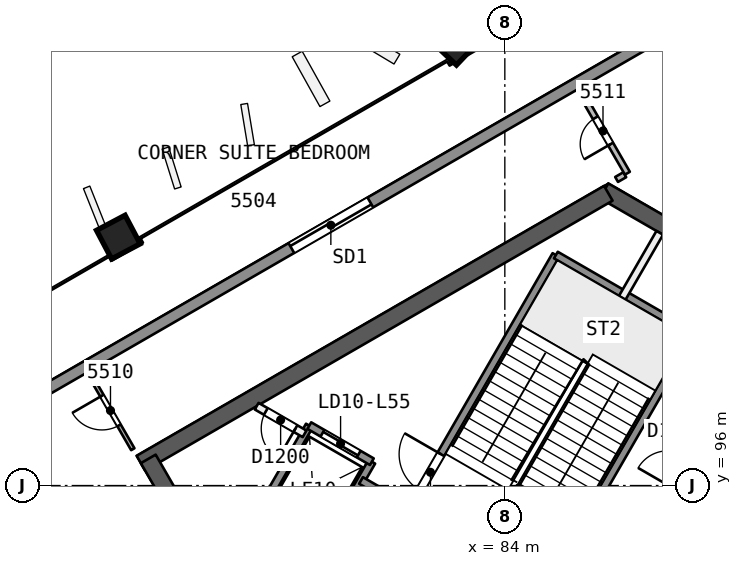
"""IFC4 building model, lengths in metres.
Left out: names, types, materials, properties, quantities, classifications, styles, units other than length and angle.
Written with IfcOpenShell. Run it as: python <this file> out.ifc"""

import sys

from ifc_helpers import new_model, si_unit, direction, frame, frame_2d, origin, origin_2d, place, context, subcontext, project, spatial, rectangle, extrude, element, fill, save


model = new_model("IFC4")
c1 = context("Model", 3, precision=1e-05, world=origin(), true_north=direction((0.0, 1.0)))
c2 = subcontext(c1, "Body", "Model", "MODEL_VIEW")
j1 = project(units=[si_unit("LENGTHUNIT", "METRE"), si_unit("PLANEANGLEUNIT", "RADIAN")], contexts=[c1])
p1 = place(None, origin())
s1 = spatial("IfcSite", under=j1, at=p1, CompositionType="ELEMENT")
p2 = place(p1, origin())
s2 = spatial("IfcBuilding", under=s1, at=p2, CompositionType="ELEMENT")
p3 = place(p2, frame((0.0, 0.0, 224.3)))
s3 = spatial("IfcBuildingStorey", under=s2, at=p3, CompositionType="ELEMENT", Elevation=224.3)
p4 = place(p3, frame((89.655, 101.998, 0.0), z_axis=(0.0, 0.0, 1.0), x_axis=(-0.866042179588, 0.49997094233, 0.0)))
e1 = element("IfcWall", 1, at=p4, inside=s3, PredefinedType="SHEAR", context=c2, shape_type="SweptSolid", body=[
    extrude(rectangle(XDim=3.515, YDim=0.45, at=frame_2d((1.758, 0.0))), origin(), (0.0, 0.0, 1.0), 3.7),
])
p5 = place(p3, frame((86.723, 103.69, 0.0), z_axis=(0.0, 0.0, 1.0), x_axis=(-0.866022713978, -0.500004658852, 0.0)))
e2 = element("IfcWall", 2, at=p5, inside=s3, PredefinedType="SHEAR", context=c2, shape_type="SweptSolid", body=[
    extrude(rectangle(XDim=14.203, YDim=0.45, at=frame_2d((7.102, 0.0))), origin(), (0.0, 0.0, 1.0), 3.7),
])
p6 = place(p3, frame((74.617, 96.701, 0.0), z_axis=(0.0, 0.0, 1.0), x_axis=(0.499994385119, -0.866028645513, 0.0)))
e3 = element("IfcWall", 3, at=p6, inside=s3, PredefinedType="SHEAR", context=c2, shape_type="SweptSolid", body=[
    extrude(rectangle(XDim=10.155, YDim=0.45, at=frame_2d((5.077, 0.0))), origin(), (0.0, 0.0, 1.0), 3.7),
])
p7 = place(p6, frame((8.005, 0.0, 0.0)))
e4 = element("IfcOpeningElement", 4, at=p7, cuts=e3, PredefinedType="OPENING", context=c2, shape_type="SweptSolid", body=[
    extrude(rectangle(XDim=1.2, YDim=2.1, at=frame_2d((0.6, 1.05))), frame((0.0, 0.235, 0.0), z_axis=(0.0, -1.0, 0.0), x_axis=(1.0, 0.0, 0.0)), (0.0, 0.0, 1.0), 0.471),
])
p8 = place(p3, frame((82.721, 107.699, 0.0), z_axis=(-0.008376454378, -0.028163354484, 0.999568237028), x_axis=(0.865850871468, 0.499846877556, 0.02133933866)))
e5 = element("IfcColumn", 5, at=p8, inside=s3, PredefinedType="COLUMN", context=c2, shape_type="SweptSolid", body=[
    extrude(rectangle(XDim=0.85, YDim=0.85, at=origin_2d()), origin(), (0.0, 0.0, 1.0), 3.702),
])
p9 = place(p3, frame((73.829, 102.565, 0.0), z_axis=(0.000857578916, -0.022824792675, 0.999739112668), x_axis=(0.866060219769, 0.499825848733, 0.01066848966)))
e6 = element("IfcColumn", 6, at=p9, inside=s3, PredefinedType="COLUMN", context=c2, shape_type="SweptSolid", body=[
    extrude(rectangle(XDim=0.85, YDim=0.85, at=origin_2d()), origin(), (0.0, 0.0, 1.0), 3.701),
])
p10 = place(p3, frame((74.21, 96.956, 0.0), z_axis=(0.0, 0.0, 1.0), x_axis=(-0.499950341091, 0.86605407247, 0.0)))
e7 = element("IfcWall", 7, at=p10, inside=s3, PredefinedType="PARTITIONING", context=c2, shape_type="SweptSolid", body=[
    extrude(rectangle(XDim=2.349, YDim=0.1, at=frame_2d((1.175, 0.0))), origin(), (0.0, 0.0, 1.0), 3.3),
])
p11 = place(p10, frame((0.725, 0.0, 0.0)))
e8 = element("IfcOpeningElement", 8, at=p11, cuts=e7, PredefinedType="OPENING", context=c2, shape_type="SweptSolid", body=[
    extrude(rectangle(XDim=0.9, YDim=2.1, at=frame_2d((0.45, 1.05))), frame((0.0, 0.061, 0.0), z_axis=(0.0, -1.0, 0.0), x_axis=(1.0, 0.0, 0.0)), (0.0, 0.0, 1.0), 0.121),
])
p12 = place(p3, frame((68.446, 96.34, 0.0), z_axis=(0.0, 0.0, 1.0), x_axis=(0.500019482754, -0.866014155119, 0.0)))
e9 = element("IfcWall", 9, at=p12, inside=s3, PredefinedType="PARTITIONING", context=c2, shape_type="SweptSolid", body=[
    extrude(rectangle(XDim=7.328, YDim=0.2, at=frame_2d((3.664, 0.0))), origin(), (0.0, 0.0, 1.0), 3.3),
])
p13 = place(p3, frame((86.941, 104.054, 0.0), z_axis=(0.0, 0.0, 1.0), x_axis=(0.865808178054, 0.500376057396, 0.0)))
e10 = element("IfcWall", 10, at=p13, inside=s3, PredefinedType="PARTITIONING", context=c2, shape_type="SweptSolid", body=[
    extrude(rectangle(XDim=0.248, YDim=0.15, at=frame_2d((0.124, 0.0))), origin(), (0.0, 0.0, 1.0), 3.3),
])
p14 = place(p3, frame((87.225, 104.218, 0.0), z_axis=(0.0, 0.0, 1.0), x_axis=(-0.500046250861, 0.86599869919, 0.0)))
e11 = element("IfcWall", 11, at=p14, inside=s3, PredefinedType="PARTITIONING", context=c2, shape_type="SweptSolid", body=[
    extrude(rectangle(XDim=2.567, YDim=0.15, at=frame_2d((1.284, 0.0))), origin(), (0.0, 0.0, 1.0), 3.3),
])
p15 = place(p14, frame((0.884, 0.0, 0.0)))
e12 = element("IfcOpeningElement", 12, at=p15, cuts=e11, PredefinedType="OPENING", context=c2, shape_type="SweptSolid", body=[
    extrude(rectangle(XDim=0.8, YDim=2.1, at=frame_2d((0.4, 1.05))), frame((0.0, 0.085, 0.0), z_axis=(0.0, -1.0, 0.0), x_axis=(1.0, 0.0, 0.0)), (0.0, 0.0, 1.0), 0.171),
])
p16 = place(p3, frame((88.099, 107.859, 0.0), z_axis=(0.0, 0.0, 1.0), x_axis=(0.866032272612, -0.499988102653, 0.0)))
e13 = element("IfcWall", 13, at=p16, inside=s3, PredefinedType="SOLIDWALL", context=c2, shape_type="SweptSolid", body=[
    extrude(rectangle(XDim=5.171, YDim=0.3, at=frame_2d((2.585, 0.0))), origin(), (0.0, 0.0, 1.0), 3.3),
])
p17 = place(p3, frame((44.324, 82.585, 0.0), z_axis=(0.0, 0.0, 1.0), x_axis=(0.86602584856, 0.499999229625, 0.0)))
e14 = element("IfcWall", 14, at=p17, inside=s3, PredefinedType="SOLIDWALL", context=c2, shape_type="SweptSolid", body=[
    extrude(rectangle(XDim=50.547, YDim=0.3, at=frame_2d((25.274, 0.0))), origin(), (0.0, 0.0, 1.0), 3.3),
])
p18 = place(p17, frame((24.23, 0.0, 0.0)))
e15 = element("IfcOpeningElement", 15, at=p18, cuts=e14, PredefinedType="OPENING", context=c2, shape_type="SweptSolid", body=[
    extrude(rectangle(XDim=2.4, YDim=2.4, at=frame_2d((1.2, 1.2))), frame((0.0, 0.161, 0.0), z_axis=(0.0, -1.0, 0.0), x_axis=(1.0, 0.0, 0.0)), (0.0, 0.0, 1.0), 0.321),
])
p19 = place(p17, frame((29.218, 0.0, 0.0)))
e16 = element("IfcOpeningElement", 16, at=p19, cuts=e14, PredefinedType="OPENING", context=c2, shape_type="SweptSolid", body=[
    extrude(rectangle(XDim=2.4, YDim=2.4, at=frame_2d((1.2, 1.2))), frame((0.0, 0.161, 0.0), z_axis=(0.0, -1.0, 0.0), x_axis=(1.0, 0.0, 0.0)), (0.0, 0.0, 1.0), 0.321),
])
p20 = place(p17, frame((39.328, 0.0, 0.0)))
e17 = element("IfcOpeningElement", 17, at=p20, cuts=e14, PredefinedType="OPENING", context=c2, shape_type="SweptSolid", body=[
    extrude(rectangle(XDim=2.4, YDim=2.4, at=frame_2d((1.2, 1.2))), frame((0.0, 0.161, 0.0), z_axis=(0.0, -1.0, 0.0), x_axis=(1.0, 0.0, 0.0)), (0.0, 0.0, 1.0), 0.321),
])
p21 = place(p17, frame((19.085, 0.0, 0.0)))
e18 = element("IfcOpeningElement", 18, at=p21, cuts=e14, PredefinedType="OPENING", context=c2, shape_type="SweptSolid", body=[
    extrude(rectangle(XDim=2.4, YDim=2.4, at=frame_2d((1.2, 1.2))), frame((0.0, 0.161, 0.0), z_axis=(0.0, -1.0, 0.0), x_axis=(1.0, 0.0, 0.0)), (0.0, 0.0, 1.0), 0.321),
])
p22 = place(p17, frame((8.771, 0.0, 0.0)))
e19 = element("IfcOpeningElement", 19, at=p22, cuts=e14, PredefinedType="OPENING", context=c2, shape_type="SweptSolid", body=[
    extrude(rectangle(XDim=2.4, YDim=2.4, at=frame_2d((1.2, 1.2))), frame((0.0, 0.161, 0.0), z_axis=(0.0, -1.0, 0.0), x_axis=(1.0, 0.0, 0.0)), (0.0, 0.0, 1.0), 0.321),
])
p23 = place(p3, frame((87.621, 94.86, 0.0), z_axis=(0.0, 0.0, 1.0), x_axis=(0.499993116331, 0.866029378036, 0.0)))
e20 = element("IfcWall", 20, at=p23, inside=s3, PredefinedType="PARTITIONING", context=c2, shape_type="SweptSolid", body=[
    extrude(rectangle(XDim=3.618, YDim=0.15, at=frame_2d((1.809, 0.0))), origin(), (0.0, 0.0, 1.0), 3.3),
])
p24 = place(p23, frame((1.332, 0.0, 0.0)))
e21 = element("IfcOpeningElement", 21, at=p24, cuts=e20, PredefinedType="OPENING", context=c2, shape_type="SweptSolid", body=[
    extrude(rectangle(XDim=0.9, YDim=2.1, at=frame_2d((0.45, 1.05))), frame((0.0, 0.085, 0.0), z_axis=(0.0, -1.0, 0.0), x_axis=(1.0, 0.0, 0.0)), (0.0, 0.0, 1.0), 0.171),
])
p25 = place(p3, frame((85.087, 93.321, 0.0), z_axis=(0.0, 0.0, 1.0), x_axis=(0.500019787375, 0.866013979237, 0.0)))
e22 = element("IfcWall", 22, at=p25, inside=s3, PredefinedType="SOLIDWALL", context=c2, shape_type="SweptSolid", body=[
    extrude(rectangle(XDim=7.7, YDim=0.2, at=frame_2d((3.85, 0.0))), origin(), (0.0, 0.0, 1.0), 3.3),
])
p26 = place(p3, frame((87.09, 100.94, 0.0), z_axis=(0.0, 0.0, 1.0), x_axis=(0.500011643316, 0.866018681408, 0.0)))
e23 = element("IfcWall", 23, at=p26, inside=s3, PredefinedType="PARTITIONING", context=c2, shape_type="SweptSolid", body=[
    extrude(rectangle(XDim=1.973, YDim=0.2, at=frame_2d((0.987, 0.0))), origin(), (0.0, 0.0, 1.0), 3.3),
])
p27 = place(p3, frame((81.493, 95.396, 0.0), z_axis=(0.0, 0.0, 1.0), x_axis=(0.500006057782, 0.866021906294, 0.0)))
e24 = element("IfcWall", 24, at=p27, inside=s3, PredefinedType="SOLIDWALL", context=c2, shape_type="SweptSolid", body=[
    extrude(rectangle(XDim=7.7, YDim=0.2, at=frame_2d((3.85, 0.0))), origin(), (0.0, 0.0, 1.0), 3.3),
])
p28 = place(p27, frame((0.55, 0.0, 0.0)))
e25 = element("IfcOpeningElement", 25, at=p28, cuts=e24, PredefinedType="OPENING", context=c2, shape_type="SweptSolid", body=[
    extrude(rectangle(XDim=1.1, YDim=2.1, at=frame_2d((0.55, 1.05))), frame((0.0, 0.11, 0.0), z_axis=(0.0, -1.0, 0.0), x_axis=(1.0, 0.0, 0.0)), (0.0, 0.0, 1.0), 0.221),
])
for number, where, z_axis, x_axis in (
    (26, (78.976, 93.986, 0.0), (0.0, 0.0, 1.0), (0.5, 0.866, 0.0)),
    (27, (77.33, 94.936, 0.0), (0.0, 0.0, 1.0), (0.5, 0.866, 0.0)),
):
    element("IfcWall", number, at=place(p3, frame(where, z_axis=z_axis, x_axis=x_axis)), inside=s3, PredefinedType="SOLIDWALL", context=c2, shape_type="SweptSolid", body=[
        extrude(rectangle(XDim=3.05, YDim=0.2, at=frame_2d((1.525, 0.0))), origin(), (0.0, 0.0, 1.0), 3.3),
    ])
p29 = place(p3, frame((89.43, 90.814, 0.0), z_axis=(0.0, 0.0, 1.0), x_axis=(-0.866018983788, 0.500011119594, 0.0)))
e28 = element("IfcWall", 28, at=p29, inside=s3, PredefinedType="SOLIDWALL", context=c2, shape_type="SweptSolid", body=[
    extrude(rectangle(XDim=10.64, YDim=0.2, at=frame_2d((5.32, 0.0))), origin(), (0.0, 0.0, 1.0), 3.3),
])
p30 = place(p29, frame((0.37, 0.0, 0.0)))
e29 = element("IfcOpeningElement", 29, at=p30, cuts=e28, PredefinedType="OPENING", context=c2, shape_type="SweptSolid", body=[
    extrude(rectangle(XDim=0.9, YDim=2.1, at=frame_2d((0.45, 1.05))), frame((0.0, 0.11, 0.0), z_axis=(0.0, -1.0, 0.0), x_axis=(1.0, 0.0, 0.0)), (0.0, 0.0, 1.0), 0.221),
])
p31 = place(p3, frame((78.73, 97.361, 0.0), z_axis=(0.0, 0.0, 1.0), x_axis=(-0.866045896294, 0.499964504253, 0.0)))
e30 = element("IfcWall", 30, at=p31, inside=s3, PredefinedType="PARTITIONING", context=c2, shape_type="SweptSolid", body=[
    extrude(rectangle(XDim=1.455, YDim=0.2, at=frame_2d((0.728, 0.0))), origin(), (0.0, 0.0, 1.0), 3.3),
])
p32 = place(p31, frame((0.278, 0.0, 0.0)))
e31 = element("IfcOpeningElement", 31, at=p32, cuts=e30, PredefinedType="OPENING", context=c2, shape_type="SweptSolid", body=[
    extrude(rectangle(XDim=0.9, YDim=2.1, at=frame_2d((0.45, 1.05))), frame((0.0, 0.11, 0.0), z_axis=(0.0, -1.0, 0.0), x_axis=(1.0, 0.0, 0.0)), (0.0, 0.0, 1.0), 0.221),
])
p33 = place(p3, frame((80.5, 96.627, 0.0), z_axis=(0.0, 0.0, 1.0), x_axis=(-0.86601224135, 0.500022797313, 0.0)))
e32 = element("IfcWall", 32, at=p33, inside=s3, PredefinedType="SOLIDWALL", context=c2, shape_type="SweptSolid", body=[
    extrude(rectangle(XDim=1.9, YDim=0.2, at=frame_2d((0.95, 0.0))), origin(), (0.0, 0.0, 1.0), 3.3),
])
p34 = place(p33, frame((0.4, 0.0, 0.0)))
e33 = element("IfcOpeningElement", 33, at=p34, cuts=e32, PredefinedType="OPENING", context=c2, shape_type="SweptSolid", body=[
    extrude(rectangle(XDim=1.1, YDim=2.1, at=frame_2d((0.55, 1.05))), frame((0.0, 0.11, 0.0), z_axis=(0.0, -1.0, 0.0), x_axis=(1.0, 0.0, 0.0)), (0.0, 0.0, 1.0), 0.221),
])
p35 = place(p3, frame((88.937, 99.99, 0.0), z_axis=(0.0, 0.0, 1.0), x_axis=(-0.866004344652, 0.500036473714, 0.0)))
e34 = element("IfcWall", 34, at=p35, inside=s3, PredefinedType="SOLIDWALL", context=c2, shape_type="SweptSolid", body=[
    extrude(rectangle(XDim=4.15, YDim=0.2, at=frame_2d((2.075, 0.0))), origin(), (0.0, 0.0, 1.0), 3.3),
])
p36 = place(p11, origin())
e35 = element("IfcDoor", 35, at=p36, inside=s3, OperationType="SINGLE_SWING_RIGHT", PredefinedType="NOTDEFINED", context=c2, shape_type="SweptSolid", body=[
    extrude(rectangle(XDim=0.9, YDim=2.1, at=frame_2d((0.45, 1.05))), frame((0.0, 0.025, 0.0), z_axis=(0.0, -1.0, 0.0), x_axis=(1.0, 0.0, 0.0)), (0.0, 0.0, 1.0), 0.05),
])
fill(e8, e35)
p37 = place(p15, origin())
e36 = element("IfcDoor", 36, at=p37, inside=s3, OperationType="SINGLE_SWING_LEFT", PredefinedType="NOTDEFINED", context=c2, shape_type="SweptSolid", body=[
    extrude(rectangle(XDim=0.8, YDim=2.1, at=frame_2d((0.4, 1.05))), frame((0.0, 0.025, 0.0), z_axis=(0.0, -1.0, 0.0), x_axis=(1.0, 0.0, 0.0)), (0.0, 0.0, 1.0), 0.05),
])
fill(e12, e36)
p38 = place(p20, origin())
e37 = element("IfcDoor", 37, at=p38, inside=s3, OperationType="SLIDING_TO_LEFT", PredefinedType="NOTDEFINED", context=c2, shape_type="SweptSolid", body=[
    extrude(rectangle(XDim=2.4, YDim=2.4, at=frame_2d((1.2, 1.2))), frame((0.0, 0.025, 0.0), z_axis=(0.0, -1.0, 0.0), x_axis=(1.0, 0.0, 0.0)), (0.0, 0.0, 1.0), 0.05),
])
fill(e17, e37)
p39 = place(p34, origin())
e38 = element("IfcDoor", 38, at=p39, inside=s3, OperationType="SLIDING_TO_RIGHT", PredefinedType="NOTDEFINED", context=c2, shape_type="SweptSolid", body=[
    extrude(rectangle(XDim=1.1, YDim=2.1, at=frame_2d((0.55, 1.05))), frame((0.0, 0.025, 0.0), z_axis=(0.0, -1.0, 0.0), x_axis=(1.0, 0.0, 0.0)), (0.0, 0.0, 1.0), 0.05),
])
fill(e33, e38)
p40 = place(p32, origin())
e39 = element("IfcDoor", 39, at=p40, inside=s3, OperationType="SINGLE_SWING_LEFT", PredefinedType="NOTDEFINED", context=c2, shape_type="SweptSolid", body=[
    extrude(rectangle(XDim=0.9, YDim=2.1, at=frame_2d((0.45, 1.05))), frame((0.0, 0.025, 0.0), z_axis=(0.0, -1.0, 0.0), x_axis=(1.0, 0.0, 0.0)), (0.0, 0.0, 1.0), 0.05),
])
fill(e31, e39)
p41 = place(p28, origin())
e40 = element("IfcDoor", 40, at=p41, inside=s3, OperationType="SINGLE_SWING_RIGHT", PredefinedType="NOTDEFINED", context=c2, shape_type="SweptSolid", body=[
    extrude(rectangle(XDim=1.1, YDim=2.1, at=frame_2d((0.55, 1.05))), frame((0.0, 0.025, 0.0), z_axis=(0.0, -1.0, 0.0), x_axis=(1.0, 0.0, 0.0)), (0.0, 0.0, 1.0), 0.05),
])
fill(e25, e40)
save(model, sys.argv[1])
